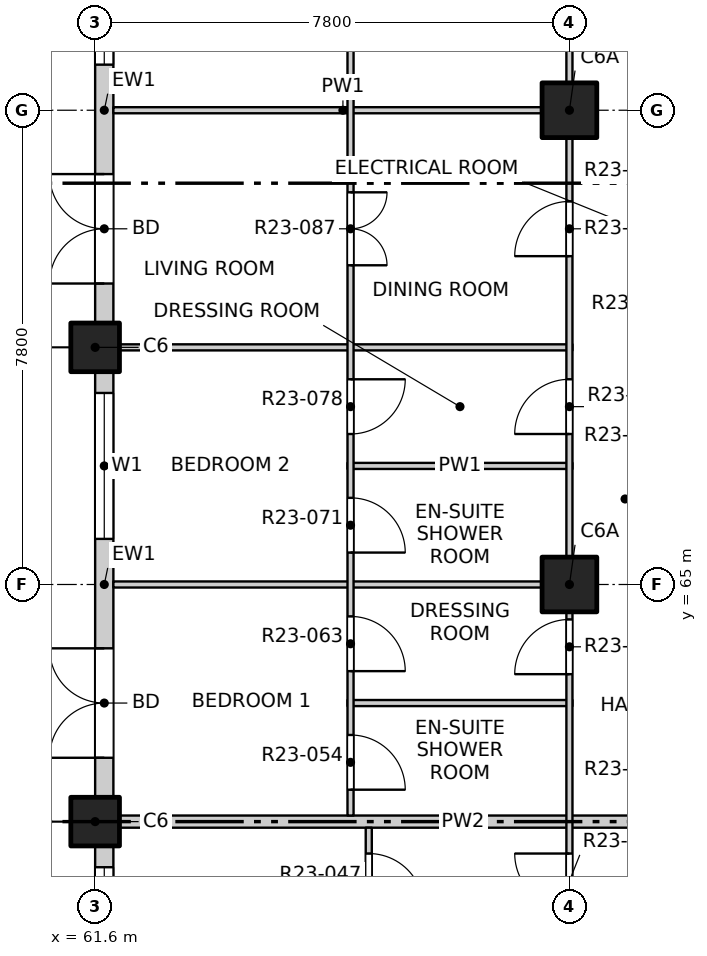
"""IFC4 building model, lengths in metres.
Left out: names, types, materials, properties, quantities, classifications, styles, units other than length and angle.
Written with IfcOpenShell. Run it as: python <this file> out.ifc"""

import sys

from ifc_helpers import new_model, si_unit, direction, frame, frame_2d, origin, origin_2d, place, context, subcontext, project, spatial, rectangle, extrude, element, fill, save


model = new_model("IFC4")
c1 = context("Model", 3, precision=1e-05, world=origin(), true_north=direction((0.0, 1.0)))
c2 = subcontext(c1, "Body", "Model", "MODEL_VIEW")
j1 = project(units=[si_unit("LENGTHUNIT", "METRE"), si_unit("PLANEANGLEUNIT", "RADIAN")], contexts=[c1])
p1 = place(None, origin())
s1 = spatial("IfcSite", under=j1, at=p1, CompositionType="ELEMENT")
p2 = place(p1, origin())
s2 = spatial("IfcBuilding", under=s1, at=p2, CompositionType="ELEMENT")
p3 = place(p2, frame((0.0, 0.0, 238.1)))
s3 = spatial("IfcBuildingStorey", under=s2, at=p3, CompositionType="ELEMENT", Elevation=238.1)
for number, where, z_axis, x_axis in (
    (1, (61.6, 61.1, -0.25), (0.0, 0.0, 1.0), (1.0, 0.0, 0.0)),
    (2, (61.6, 68.9, -0.25), (0.0, 0.0, 1.0), (1.0, 0.0, 0.0)),
):
    element("IfcColumn", number, at=place(p3, frame(where, z_axis=z_axis, x_axis=x_axis)), inside=s3, PredefinedType="COLUMN", context=c2, shape_type="SweptSolid", body=[
        extrude(rectangle(XDim=0.8, YDim=0.8, at=origin_2d()), origin(), (0.0, 0.0, 1.0), 3.35),
    ])
for number, where, z_axis, x_axis in (
    (3, (69.4, 65.0, -0.25), (0.0, 0.0, 1.0), (1.0, 0.0, 0.0)),
    (4, (69.4, 72.8, -0.25), (0.0, 0.0, 1.0), (1.0, 0.0, 0.0)),
):
    element("IfcColumn", number, at=place(p3, frame(where, z_axis=z_axis, x_axis=x_axis)), inside=s3, PredefinedType="COLUMN", context=c2, shape_type="SweptSolid", body=[
        extrude(rectangle(XDim=0.9, YDim=0.9, at=origin_2d()), origin(), (0.0, 0.0, 1.0), 3.35),
    ])
p4 = place(p3, frame((61.75, 53.7, 0.0), z_axis=(0.0, 0.0, 1.0), x_axis=(0.0, 1.0, 0.0)))
e5 = element("IfcWall", 5, at=p4, inside=s3, PredefinedType="SOLIDWALL", context=c2, shape_type="SweptSolid", body=[
    extrude(rectangle(XDim=7.0, YDim=0.3, at=frame_2d((3.5, 0.0))), origin(), (0.0, 0.0, 1.0), 3.1),
])
p5 = place(p4, frame((0.65, 0.0, 0.0)))
e6 = element("IfcOpeningElement", 6, at=p5, cuts=e5, PredefinedType="OPENING", context=c2, shape_type="SweptSolid", body=[
    extrude(rectangle(XDim=1.8, YDim=2.4, at=frame_2d((0.9, 1.2))), frame((0.0, 0.16, 0.0), z_axis=(0.0, -1.0, 0.0), x_axis=(1.0, 0.0, 0.0)), (0.0, 0.0, 1.0), 0.32),
])
p6 = place(p4, frame((4.25, 0.0, 0.9)))
e7 = element("IfcOpeningElement", 7, at=p6, cuts=e5, PredefinedType="OPENING", context=c2, shape_type="SweptSolid", body=[
    extrude(rectangle(XDim=2.4, YDim=1.8, at=frame_2d((1.2, 0.9))), frame((0.0, 0.16, 0.0), z_axis=(0.0, -1.0, 0.0), x_axis=(1.0, 0.0, 0.0)), (0.0, 0.0, 1.0), 0.32),
])
p7 = place(p3, frame((61.75, 61.5, 0.0), z_axis=(0.0, 0.0, 1.0), x_axis=(0.0, 1.0, 0.0)))
e8 = element("IfcWall", 8, at=p7, inside=s3, PredefinedType="SOLIDWALL", context=c2, shape_type="SweptSolid", body=[
    extrude(rectangle(XDim=7.0, YDim=0.3, at=frame_2d((3.5, 0.0))), origin(), (0.0, 0.0, 1.0), 3.1),
])
p8 = place(p7, frame((0.65, 0.0, 0.0)))
e9 = element("IfcOpeningElement", 9, at=p8, cuts=e8, PredefinedType="OPENING", context=c2, shape_type="SweptSolid", body=[
    extrude(rectangle(XDim=1.8, YDim=2.4, at=frame_2d((0.9, 1.2))), frame((0.0, 0.16, 0.0), z_axis=(0.0, -1.0, 0.0), x_axis=(1.0, 0.0, 0.0)), (0.0, 0.0, 1.0), 0.32),
])
p9 = place(p7, frame((4.25, 0.0, 0.9)))
e10 = element("IfcOpeningElement", 10, at=p9, cuts=e8, PredefinedType="OPENING", context=c2, shape_type="SweptSolid", body=[
    extrude(rectangle(XDim=2.4, YDim=1.8, at=frame_2d((1.2, 0.9))), frame((0.0, 0.16, 0.0), z_axis=(0.0, -1.0, 0.0), x_axis=(1.0, 0.0, 0.0)), (0.0, 0.0, 1.0), 0.32),
])
p10 = place(p3, frame((61.75, 69.3, 0.0), z_axis=(0.0, 0.0, 1.0), x_axis=(0.0, 1.0, 0.0)))
e11 = element("IfcWall", 11, at=p10, inside=s3, PredefinedType="SOLIDWALL", context=c2, shape_type="SweptSolid", body=[
    extrude(rectangle(XDim=7.0, YDim=0.3, at=frame_2d((3.5, 0.0))), origin(), (0.0, 0.0, 1.0), 3.1),
])
p11 = place(p10, frame((0.65, 0.0, 0.0)))
e12 = element("IfcOpeningElement", 12, at=p11, cuts=e11, PredefinedType="OPENING", context=c2, shape_type="SweptSolid", body=[
    extrude(rectangle(XDim=1.8, YDim=2.4, at=frame_2d((0.9, 1.2))), frame((0.0, 0.16, 0.0), z_axis=(0.0, -1.0, 0.0), x_axis=(1.0, 0.0, 0.0)), (0.0, 0.0, 1.0), 0.32),
])
p12 = place(p10, frame((4.25, 0.0, 0.9)))
e13 = element("IfcOpeningElement", 13, at=p12, cuts=e11, PredefinedType="OPENING", context=c2, shape_type="SweptSolid", body=[
    extrude(rectangle(XDim=2.4, YDim=1.8, at=frame_2d((1.2, 0.9))), frame((0.0, 0.16, 0.0), z_axis=(0.0, -1.0, 0.0), x_axis=(1.0, 0.0, 0.0)), (0.0, 0.0, 1.0), 0.32),
])
p13 = place(p3, frame((61.9, 61.1, 0.0), z_axis=(0.0, 0.0, 1.0), x_axis=(1.0, 0.0, 0.0)))
e14 = element("IfcWall", 14, at=p13, inside=s3, PredefinedType="PARTITIONING", context=c2, shape_type="SweptSolid", body=[
    extrude(rectangle(XDim=11.5, YDim=0.2, at=frame_2d((5.75, 0.0))), origin(), (0.0, 0.0, 1.0), 3.1),
])
p14 = place(p3, frame((65.75, 63.05, 0.0), z_axis=(0.0, 0.0, 1.0), x_axis=(1.0, 0.0, 0.0)))
e15 = element("IfcWall", 15, at=p14, inside=s3, PredefinedType="PARTITIONING", context=c2, shape_type="SweptSolid", body=[
    extrude(rectangle(XDim=3.7, YDim=0.1, at=frame_2d((1.85, 0.0))), origin(), (0.0, 0.0, 1.0), 3.1),
])
p15 = place(p3, frame((61.9, 65.0, 0.0), z_axis=(0.0, 0.0, 1.0), x_axis=(1.0, 0.0, 0.0)))
e16 = element("IfcWall", 16, at=p15, inside=s3, PredefinedType="PARTITIONING", context=c2, shape_type="SweptSolid", body=[
    extrude(rectangle(XDim=7.55, YDim=0.1, at=frame_2d((3.775, 0.0))), origin(), (0.0, 0.0, 1.0), 3.1),
])
p16 = place(p3, frame((65.75, 66.95, 0.0), z_axis=(0.0, 0.0, 1.0), x_axis=(1.0, 0.0, 0.0)))
e17 = element("IfcWall", 17, at=p16, inside=s3, PredefinedType="PARTITIONING", context=c2, shape_type="SweptSolid", body=[
    extrude(rectangle(XDim=3.7, YDim=0.1, at=frame_2d((1.85, 0.0))), origin(), (0.0, 0.0, 1.0), 3.1),
])
for number, where, z_axis, x_axis in (
    (18, (61.9, 68.9, 0.0), (0.0, 0.0, 1.0), (1.0, 0.0, 0.0)),
    (19, (61.9, 72.8, 0.0), (0.0, 0.0, 1.0), (1.0, 0.0, 0.0)),
):
    element("IfcWall", number, at=place(p3, frame(where, z_axis=z_axis, x_axis=x_axis)), inside=s3, PredefinedType="PARTITIONING", context=c2, shape_type="SweptSolid", body=[
        extrude(rectangle(XDim=7.55, YDim=0.1, at=frame_2d((3.775, 0.0))), origin(), (0.0, 0.0, 1.0), 3.1),
    ])
p17 = place(p3, frame((65.8, 61.2, 0.0), z_axis=(0.0, 0.0, 1.0), x_axis=(0.0, 1.0, 0.0)))
e20 = element("IfcWall", 20, at=p17, inside=s3, PredefinedType="PARTITIONING", context=c2, shape_type="SweptSolid", body=[
    extrude(rectangle(XDim=15.4, YDim=0.1, at=frame_2d((7.7, 0.0))), origin(), (0.0, 0.0, 1.0), 3.1),
])
p18 = place(p17, frame((0.425, 0.0, 0.0)))
e21 = element("IfcOpeningElement", 21, at=p18, cuts=e20, PredefinedType="OPENING", context=c2, shape_type="SweptSolid", body=[
    extrude(rectangle(XDim=0.9, YDim=2.1, at=frame_2d((0.45, 1.05))), frame((0.0, 0.06, 0.0), z_axis=(0.0, -1.0, 0.0), x_axis=(1.0, 0.0, 0.0)), (0.0, 0.0, 1.0), 0.12),
])
p19 = place(p17, frame((2.375, 0.0, 0.0)))
e22 = element("IfcOpeningElement", 22, at=p19, cuts=e20, PredefinedType="OPENING", context=c2, shape_type="SweptSolid", body=[
    extrude(rectangle(XDim=0.9, YDim=2.1, at=frame_2d((0.45, 1.05))), frame((0.0, 0.06, 0.0), z_axis=(0.0, -1.0, 0.0), x_axis=(1.0, 0.0, 0.0)), (0.0, 0.0, 1.0), 0.12),
])
p20 = place(p17, frame((4.325, 0.0, 0.0)))
e23 = element("IfcOpeningElement", 23, at=p20, cuts=e20, PredefinedType="OPENING", context=c2, shape_type="SweptSolid", body=[
    extrude(rectangle(XDim=0.9, YDim=2.1, at=frame_2d((0.45, 1.05))), frame((0.0, 0.06, 0.0), z_axis=(0.0, -1.0, 0.0), x_axis=(1.0, 0.0, 0.0)), (0.0, 0.0, 1.0), 0.12),
])
p21 = place(p17, frame((6.275, 0.0, 0.0)))
e24 = element("IfcOpeningElement", 24, at=p21, cuts=e20, PredefinedType="OPENING", context=c2, shape_type="SweptSolid", body=[
    extrude(rectangle(XDim=0.9, YDim=2.1, at=frame_2d((0.45, 1.05))), frame((0.0, 0.06, 0.0), z_axis=(0.0, -1.0, 0.0), x_axis=(1.0, 0.0, 0.0)), (0.0, 0.0, 1.0), 0.12),
])
p22 = place(p17, frame((9.05, 0.0, 0.0)))
e25 = element("IfcOpeningElement", 25, at=p22, cuts=e20, PredefinedType="OPENING", context=c2, shape_type="SweptSolid", body=[
    extrude(rectangle(XDim=1.2, YDim=2.1, at=frame_2d((0.6, 1.05))), frame((0.0, 0.06, 0.0), z_axis=(0.0, -1.0, 0.0), x_axis=(1.0, 0.0, 0.0)), (0.0, 0.0, 1.0), 0.12),
])
p23 = place(p17, frame((12.95, 0.0, 0.0)))
e26 = element("IfcOpeningElement", 26, at=p23, cuts=e20, PredefinedType="OPENING", context=c2, shape_type="SweptSolid", body=[
    extrude(rectangle(XDim=1.2, YDim=2.1, at=frame_2d((0.6, 1.05))), frame((0.0, 0.06, 0.0), z_axis=(0.0, -1.0, 0.0), x_axis=(1.0, 0.0, 0.0)), (0.0, 0.0, 1.0), 0.12),
])
p24 = place(p3, frame((66.1, 41.9, 0.0), z_axis=(0.0, 0.0, 1.0), x_axis=(0.0, 1.0, 0.0)))
e27 = element("IfcWall", 27, at=p24, inside=s3, PredefinedType="PARTITIONING", context=c2, shape_type="SweptSolid", body=[
    extrude(rectangle(XDim=19.1, YDim=0.1, at=frame_2d((9.55, 0.0))), origin(), (0.0, 0.0, 1.0), 3.1),
])
p25 = place(p24, frame((1.05, 0.0, 0.0)))
e28 = element("IfcOpeningElement", 28, at=p25, cuts=e27, PredefinedType="OPENING", context=c2, shape_type="SweptSolid", body=[
    extrude(rectangle(XDim=1.2, YDim=2.1, at=frame_2d((0.6, 1.05))), frame((0.0, 0.06, 0.0), z_axis=(0.0, -1.0, 0.0), x_axis=(1.0, 0.0, 0.0)), (0.0, 0.0, 1.0), 0.12),
])
p26 = place(p24, frame((4.125, 0.0, 0.0)))
e29 = element("IfcOpeningElement", 29, at=p26, cuts=e27, PredefinedType="OPENING", context=c2, shape_type="SweptSolid", body=[
    extrude(rectangle(XDim=0.9, YDim=2.1, at=frame_2d((0.45, 1.05))), frame((0.0, 0.06, 0.0), z_axis=(0.0, -1.0, 0.0), x_axis=(1.0, 0.0, 0.0)), (0.0, 0.0, 1.0), 0.12),
])
p27 = place(p24, frame((6.075, 0.0, 0.0)))
e30 = element("IfcOpeningElement", 30, at=p27, cuts=e27, PredefinedType="OPENING", context=c2, shape_type="SweptSolid", body=[
    extrude(rectangle(XDim=0.9, YDim=2.1, at=frame_2d((0.45, 1.05))), frame((0.0, 0.06, 0.0), z_axis=(0.0, -1.0, 0.0), x_axis=(1.0, 0.0, 0.0)), (0.0, 0.0, 1.0), 0.12),
])
p28 = place(p24, frame((8.025, 0.0, 0.0)))
e31 = element("IfcOpeningElement", 31, at=p28, cuts=e27, PredefinedType="OPENING", context=c2, shape_type="SweptSolid", body=[
    extrude(rectangle(XDim=0.9, YDim=2.1, at=frame_2d((0.45, 1.05))), frame((0.0, 0.06, 0.0), z_axis=(0.0, -1.0, 0.0), x_axis=(1.0, 0.0, 0.0)), (0.0, 0.0, 1.0), 0.12),
])
p29 = place(p24, frame((9.975, 0.0, 0.0)))
e32 = element("IfcOpeningElement", 32, at=p29, cuts=e27, PredefinedType="OPENING", context=c2, shape_type="SweptSolid", body=[
    extrude(rectangle(XDim=0.9, YDim=2.1, at=frame_2d((0.45, 1.05))), frame((0.0, 0.06, 0.0), z_axis=(0.0, -1.0, 0.0), x_axis=(1.0, 0.0, 0.0)), (0.0, 0.0, 1.0), 0.12),
])
p30 = place(p24, frame((12.75, 0.0, 0.0)))
e33 = element("IfcOpeningElement", 33, at=p30, cuts=e27, PredefinedType="OPENING", context=c2, shape_type="SweptSolid", body=[
    extrude(rectangle(XDim=1.2, YDim=2.1, at=frame_2d((0.6, 1.05))), frame((0.0, 0.06, 0.0), z_axis=(0.0, -1.0, 0.0), x_axis=(1.0, 0.0, 0.0)), (0.0, 0.0, 1.0), 0.12),
])
p31 = place(p24, frame((15.825, 0.0, 0.0)))
e34 = element("IfcOpeningElement", 34, at=p31, cuts=e27, PredefinedType="OPENING", context=c2, shape_type="SweptSolid", body=[
    extrude(rectangle(XDim=0.9, YDim=2.1, at=frame_2d((0.45, 1.05))), frame((0.0, 0.06, 0.0), z_axis=(0.0, -1.0, 0.0), x_axis=(1.0, 0.0, 0.0)), (0.0, 0.0, 1.0), 0.12),
])
p32 = place(p24, frame((17.775, 0.0, 0.0)))
e35 = element("IfcOpeningElement", 35, at=p32, cuts=e27, PredefinedType="OPENING", context=c2, shape_type="SweptSolid", body=[
    extrude(rectangle(XDim=0.9, YDim=2.1, at=frame_2d((0.45, 1.05))), frame((0.0, 0.06, 0.0), z_axis=(0.0, -1.0, 0.0), x_axis=(1.0, 0.0, 0.0)), (0.0, 0.0, 1.0), 0.12),
])
p33 = place(p3, frame((69.4, 41.9, 0.0), z_axis=(0.0, 0.0, 1.0), x_axis=(0.0, 1.0, 0.0)))
e36 = element("IfcWall", 36, at=p33, inside=s3, PredefinedType="PARTITIONING", context=c2, shape_type="SweptSolid", body=[
    extrude(rectangle(XDim=46.2, YDim=0.1, at=frame_2d((23.1, 0.0))), origin(), (0.0, 0.0, 1.0), 3.1),
])
p34 = place(p33, frame((1.2, 0.0, 0.0)))
e37 = element("IfcOpeningElement", 37, at=p34, cuts=e36, PredefinedType="OPENING", context=c2, shape_type="SweptSolid", body=[
    extrude(rectangle(XDim=0.9, YDim=2.1, at=frame_2d((0.45, 1.05))), frame((0.0, 0.06, 0.0), z_axis=(0.0, -1.0, 0.0), x_axis=(1.0, 0.0, 0.0)), (0.0, 0.0, 1.0), 0.12),
])
p35 = place(p33, frame((6.025, 0.0, 0.0)))
e38 = element("IfcOpeningElement", 38, at=p35, cuts=e36, PredefinedType="OPENING", context=c2, shape_type="SweptSolid", body=[
    extrude(rectangle(XDim=0.9, YDim=2.1, at=frame_2d((0.45, 1.05))), frame((0.0, 0.06, 0.0), z_axis=(0.0, -1.0, 0.0), x_axis=(1.0, 0.0, 0.0)), (0.0, 0.0, 1.0), 0.12),
])
p36 = place(p33, frame((9.975, 0.0, 0.0)))
e39 = element("IfcOpeningElement", 39, at=p36, cuts=e36, PredefinedType="OPENING", context=c2, shape_type="SweptSolid", body=[
    extrude(rectangle(XDim=0.9, YDim=2.1, at=frame_2d((0.45, 1.05))), frame((0.0, 0.06, 0.0), z_axis=(0.0, -1.0, 0.0), x_axis=(1.0, 0.0, 0.0)), (0.0, 0.0, 1.0), 0.12),
])
p37 = place(p33, frame((12.9, 0.0, 0.0)))
e40 = element("IfcOpeningElement", 40, at=p37, cuts=e36, PredefinedType="OPENING", context=c2, shape_type="SweptSolid", body=[
    extrude(rectangle(XDim=0.9, YDim=2.1, at=frame_2d((0.45, 1.05))), frame((0.0, 0.06, 0.0), z_axis=(0.0, -1.0, 0.0), x_axis=(1.0, 0.0, 0.0)), (0.0, 0.0, 1.0), 0.12),
])
p38 = place(p33, frame((17.775, 0.0, 0.0)))
e41 = element("IfcOpeningElement", 41, at=p38, cuts=e36, PredefinedType="OPENING", context=c2, shape_type="SweptSolid", body=[
    extrude(rectangle(XDim=0.9, YDim=2.1, at=frame_2d((0.45, 1.05))), frame((0.0, 0.06, 0.0), z_axis=(0.0, -1.0, 0.0), x_axis=(1.0, 0.0, 0.0)), (0.0, 0.0, 1.0), 0.12),
])
p39 = place(p33, frame((21.625, 0.0, 0.0)))
e42 = element("IfcOpeningElement", 42, at=p39, cuts=e36, PredefinedType="OPENING", context=c2, shape_type="SweptSolid", body=[
    extrude(rectangle(XDim=0.9, YDim=2.1, at=frame_2d((0.45, 1.05))), frame((0.0, 0.06, 0.0), z_axis=(0.0, -1.0, 0.0), x_axis=(1.0, 0.0, 0.0)), (0.0, 0.0, 1.0), 0.12),
])
p40 = place(p33, frame((25.575, 0.0, 0.0)))
e43 = element("IfcOpeningElement", 43, at=p40, cuts=e36, PredefinedType="OPENING", context=c2, shape_type="SweptSolid", body=[
    extrude(rectangle(XDim=0.9, YDim=2.1, at=frame_2d((0.45, 1.05))), frame((0.0, 0.06, 0.0), z_axis=(0.0, -1.0, 0.0), x_axis=(1.0, 0.0, 0.0)), (0.0, 0.0, 1.0), 0.12),
])
p41 = place(p33, frame((28.5, 0.0, 0.0)))
e44 = element("IfcOpeningElement", 44, at=p41, cuts=e36, PredefinedType="OPENING", context=c2, shape_type="SweptSolid", body=[
    extrude(rectangle(XDim=0.9, YDim=2.1, at=frame_2d((0.45, 1.05))), frame((0.0, 0.06, 0.0), z_axis=(0.0, -1.0, 0.0), x_axis=(1.0, 0.0, 0.0)), (0.0, 0.0, 1.0), 0.12),
])
p42 = place(p33, frame((32.4, 0.0, 0.0)))
e45 = element("IfcOpeningElement", 45, at=p42, cuts=e36, PredefinedType="OPENING", context=c2, shape_type="SweptSolid", body=[
    extrude(rectangle(XDim=0.9, YDim=2.1, at=frame_2d((0.45, 1.05))), frame((0.0, 0.06, 0.0), z_axis=(0.0, -1.0, 0.0), x_axis=(1.0, 0.0, 0.0)), (0.0, 0.0, 1.0), 0.12),
])
p43 = place(p33, frame((36.3, 0.0, 0.0)))
e46 = element("IfcOpeningElement", 46, at=p43, cuts=e36, PredefinedType="OPENING", context=c2, shape_type="SweptSolid", body=[
    extrude(rectangle(XDim=0.9, YDim=2.1, at=frame_2d((0.45, 1.05))), frame((0.0, 0.06, 0.0), z_axis=(0.0, -1.0, 0.0), x_axis=(1.0, 0.0, 0.0)), (0.0, 0.0, 1.0), 0.12),
])
p44 = place(p33, frame((40.2, 0.0, 0.0)))
e47 = element("IfcOpeningElement", 47, at=p44, cuts=e36, PredefinedType="OPENING", context=c2, shape_type="SweptSolid", body=[
    extrude(rectangle(XDim=0.9, YDim=2.1, at=frame_2d((0.45, 1.05))), frame((0.0, 0.06, 0.0), z_axis=(0.0, -1.0, 0.0), x_axis=(1.0, 0.0, 0.0)), (0.0, 0.0, 1.0), 0.12),
])
p45 = place(p33, frame((44.1, 0.0, 0.0)))
e48 = element("IfcOpeningElement", 48, at=p45, cuts=e36, PredefinedType="OPENING", context=c2, shape_type="SweptSolid", body=[
    extrude(rectangle(XDim=0.9, YDim=2.1, at=frame_2d((0.45, 1.05))), frame((0.0, 0.06, 0.0), z_axis=(0.0, -1.0, 0.0), x_axis=(1.0, 0.0, 0.0)), (0.0, 0.0, 1.0), 0.12),
])
p46 = place(p6, origin())
e49 = element("IfcWindow", 49, at=p46, inside=s3, PartitioningType="DOUBLE_PANEL_VERTICAL", PredefinedType="WINDOW", context=c2, shape_type="SweptSolid", body=[
    extrude(rectangle(XDim=2.4, YDim=1.8, at=frame_2d((1.2, 0.9))), frame((0.0, 0.03, 0.0), z_axis=(0.0, -1.0, 0.0), x_axis=(1.0, 0.0, 0.0)), (0.0, 0.0, 1.0), 0.06),
])
fill(e7, e49)
p47 = place(p8, origin())
e50 = element("IfcDoor", 50, at=p47, inside=s3, OperationType="DOUBLE_DOOR_SINGLE_SWING", PredefinedType="DOOR", context=c2, shape_type="SweptSolid", body=[
    extrude(rectangle(XDim=1.8, YDim=2.4, at=frame_2d((0.9, 1.2))), frame((0.0, 0.025, 0.0), z_axis=(0.0, -1.0, 0.0), x_axis=(1.0, 0.0, 0.0)), (0.0, 0.0, 1.0), 0.05),
])
fill(e9, e50)
p48 = place(p9, origin())
e51 = element("IfcWindow", 51, at=p48, inside=s3, PartitioningType="DOUBLE_PANEL_VERTICAL", PredefinedType="WINDOW", context=c2, shape_type="SweptSolid", body=[
    extrude(rectangle(XDim=2.4, YDim=1.8, at=frame_2d((1.2, 0.9))), frame((0.0, 0.03, 0.0), z_axis=(0.0, -1.0, 0.0), x_axis=(1.0, 0.0, 0.0)), (0.0, 0.0, 1.0), 0.06),
])
fill(e10, e51)
p49 = place(p11, origin())
e52 = element("IfcDoor", 52, at=p49, inside=s3, OperationType="DOUBLE_DOOR_SINGLE_SWING", PredefinedType="DOOR", context=c2, shape_type="SweptSolid", body=[
    extrude(rectangle(XDim=1.8, YDim=2.4, at=frame_2d((0.9, 1.2))), frame((0.0, 0.025, 0.0), z_axis=(0.0, -1.0, 0.0), x_axis=(1.0, 0.0, 0.0)), (0.0, 0.0, 1.0), 0.05),
])
fill(e12, e52)
p50 = place(p12, origin())
e53 = element("IfcWindow", 53, at=p50, inside=s3, PartitioningType="DOUBLE_PANEL_VERTICAL", PredefinedType="WINDOW", context=c2, shape_type="SweptSolid", body=[
    extrude(rectangle(XDim=2.4, YDim=1.8, at=frame_2d((1.2, 0.9))), frame((0.0, 0.03, 0.0), z_axis=(0.0, -1.0, 0.0), x_axis=(1.0, 0.0, 0.0)), (0.0, 0.0, 1.0), 0.06),
])
fill(e13, e53)
p51 = place(p32, origin())
e54 = element("IfcDoor", 54, at=p51, inside=s3, OperationType="SINGLE_SWING_RIGHT", PredefinedType="DOOR", context=c2, shape_type="SweptSolid", body=[
    extrude(rectangle(XDim=0.9, YDim=2.1, at=frame_2d((0.45, 1.05))), frame((0.0, 0.025, 0.0), z_axis=(0.0, -1.0, 0.0), x_axis=(1.0, 0.0, 0.0)), (0.0, 0.0, 1.0), 0.05),
])
fill(e35, e54)
p52 = place(p38, origin())
e55 = element("IfcDoor", 55, at=p52, inside=s3, OperationType="SINGLE_SWING_RIGHT", PredefinedType="DOOR", context=c2, shape_type="SweptSolid", body=[
    extrude(rectangle(XDim=0.9, YDim=2.1, at=frame_2d((0.45, 1.05))), frame((0.0, 0.025, 0.0), z_axis=(0.0, -1.0, 0.0), x_axis=(1.0, 0.0, 0.0)), (0.0, 0.0, 1.0), 0.05),
])
fill(e41, e55)
p53 = place(p18, origin())
e56 = element("IfcDoor", 56, at=p53, inside=s3, OperationType="SINGLE_SWING_RIGHT", PredefinedType="DOOR", context=c2, shape_type="SweptSolid", body=[
    extrude(rectangle(XDim=0.9, YDim=2.1, at=frame_2d((0.45, 1.05))), frame((0.0, 0.025, 0.0), z_axis=(0.0, -1.0, 0.0), x_axis=(1.0, 0.0, 0.0)), (0.0, 0.0, 1.0), 0.05),
])
fill(e21, e56)
p54 = place(p39, origin())
e57 = element("IfcDoor", 57, at=p54, inside=s3, OperationType="SINGLE_SWING_LEFT", PredefinedType="DOOR", context=c2, shape_type="SweptSolid", body=[
    extrude(rectangle(XDim=0.9, YDim=2.1, at=frame_2d((0.45, 1.05))), frame((0.0, 0.025, 0.0), z_axis=(0.0, -1.0, 0.0), x_axis=(1.0, 0.0, 0.0)), (0.0, 0.0, 1.0), 0.05),
])
fill(e42, e57)
p55 = place(p19, origin())
e58 = element("IfcDoor", 58, at=p55, inside=s3, OperationType="SINGLE_SWING_RIGHT", PredefinedType="DOOR", context=c2, shape_type="SweptSolid", body=[
    extrude(rectangle(XDim=0.9, YDim=2.1, at=frame_2d((0.45, 1.05))), frame((0.0, 0.025, 0.0), z_axis=(0.0, -1.0, 0.0), x_axis=(1.0, 0.0, 0.0)), (0.0, 0.0, 1.0), 0.05),
])
fill(e22, e58)
p56 = place(p20, origin())
e59 = element("IfcDoor", 59, at=p56, inside=s3, OperationType="SINGLE_SWING_RIGHT", PredefinedType="DOOR", context=c2, shape_type="SweptSolid", body=[
    extrude(rectangle(XDim=0.9, YDim=2.1, at=frame_2d((0.45, 1.05))), frame((0.0, 0.025, 0.0), z_axis=(0.0, -1.0, 0.0), x_axis=(1.0, 0.0, 0.0)), (0.0, 0.0, 1.0), 0.05),
])
fill(e23, e59)
p57 = place(p21, origin())
e60 = element("IfcDoor", 60, at=p57, inside=s3, OperationType="SINGLE_SWING_LEFT", PredefinedType="DOOR", context=c2, shape_type="SweptSolid", body=[
    extrude(rectangle(XDim=0.9, YDim=2.1, at=frame_2d((0.45, 1.05))), frame((0.0, 0.025, 0.0), z_axis=(0.0, -1.0, 0.0), x_axis=(1.0, 0.0, 0.0)), (0.0, 0.0, 1.0), 0.05),
])
fill(e24, e60)
p58 = place(p40, origin())
e61 = element("IfcDoor", 61, at=p58, inside=s3, OperationType="SINGLE_SWING_LEFT", PredefinedType="DOOR", context=c2, shape_type="SweptSolid", body=[
    extrude(rectangle(XDim=0.9, YDim=2.1, at=frame_2d((0.45, 1.05))), frame((0.0, 0.025, 0.0), z_axis=(0.0, -1.0, 0.0), x_axis=(1.0, 0.0, 0.0)), (0.0, 0.0, 1.0), 0.05),
])
fill(e43, e61)
p59 = place(p22, origin())
e62 = element("IfcDoor", 62, at=p59, inside=s3, OperationType="DOUBLE_DOOR_SINGLE_SWING", PredefinedType="DOOR", context=c2, shape_type="SweptSolid", body=[
    extrude(rectangle(XDim=1.2, YDim=2.1, at=frame_2d((0.6, 1.05))), frame((0.0, 0.025, 0.0), z_axis=(0.0, -1.0, 0.0), x_axis=(1.0, 0.0, 0.0)), (0.0, 0.0, 1.0), 0.05),
])
fill(e25, e62)
p60 = place(p41, origin())
e63 = element("IfcDoor", 63, at=p60, inside=s3, OperationType="SINGLE_SWING_LEFT", PredefinedType="DOOR", context=c2, shape_type="SweptSolid", body=[
    extrude(rectangle(XDim=0.9, YDim=2.1, at=frame_2d((0.45, 1.05))), frame((0.0, 0.025, 0.0), z_axis=(0.0, -1.0, 0.0), x_axis=(1.0, 0.0, 0.0)), (0.0, 0.0, 1.0), 0.05),
])
fill(e44, e63)
save(model, sys.argv[1])
